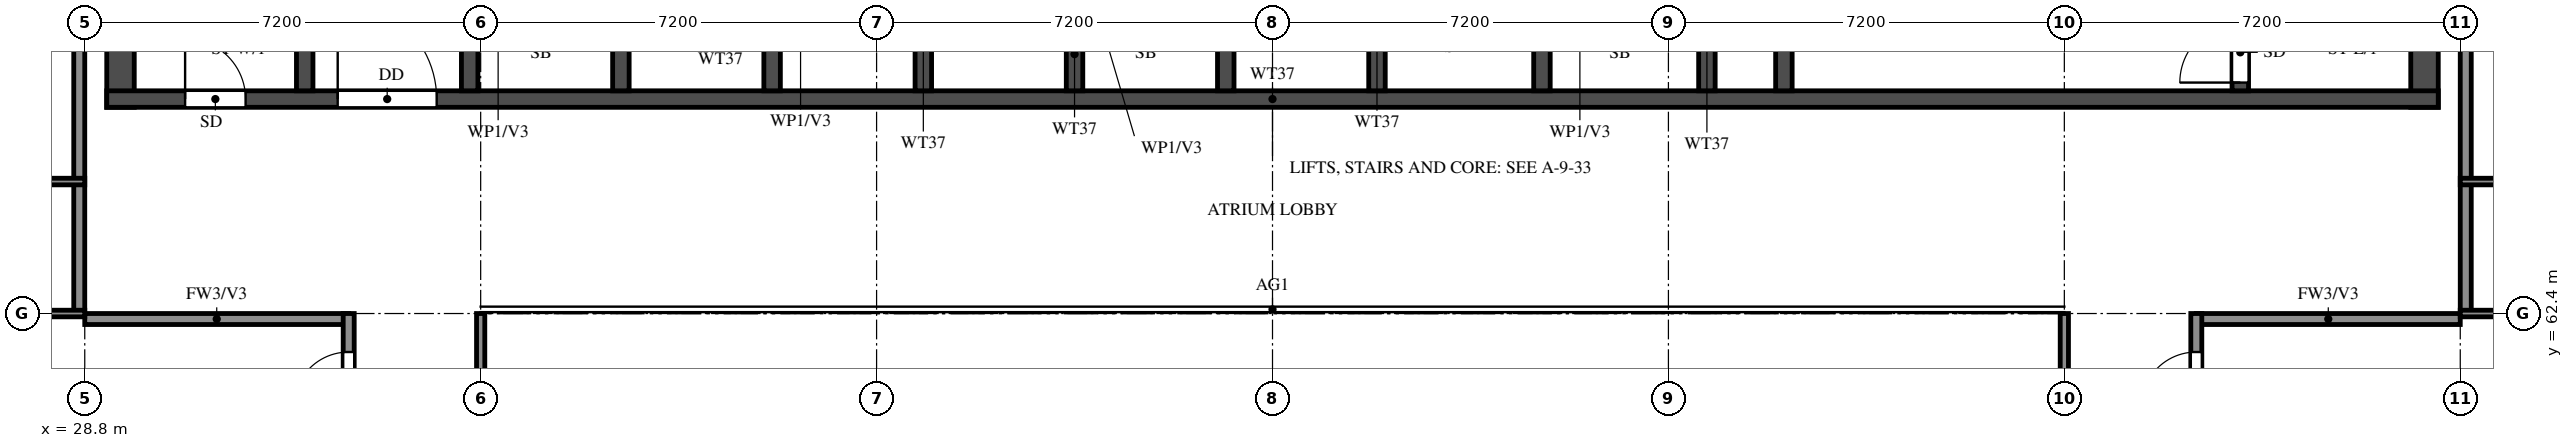
"""IFC4 building model, lengths in metres.
Left out: names, types, materials, properties, quantities, classifications, styles, units other than length and angle.
Written with IfcOpenShell. Run it as: python <this file> out.ifc"""

import sys

from ifc_helpers import new_model, si_unit, direction, frame, frame_2d, origin, place, context, subcontext, project, spatial, rectangle, extrude, element, fill, save


model = new_model("IFC4")
c1 = context("Model", 3, precision=1e-05, world=origin(), true_north=direction((0.0, 1.0)))
c2 = subcontext(c1, "Body", "Model", "MODEL_VIEW")
j1 = project(units=[si_unit("LENGTHUNIT", "METRE"), si_unit("PLANEANGLEUNIT", "RADIAN")], contexts=[c1])
p1 = place(None, origin())
s1 = spatial("IfcSite", under=j1, at=p1, CompositionType="ELEMENT")
p2 = place(p1, origin())
s2 = spatial("IfcBuilding", under=s1, at=p2, CompositionType="ELEMENT")
p3 = place(p2, frame((0.0, 0.0, 264.0)))
s3 = spatial("IfcBuildingStorey", under=s2, at=p3, CompositionType="ELEMENT", Elevation=264.0)
for number, where, z_axis, x_axis in (
    (1, (29.45, 66.15, 0.0), (0.0, 0.0, 1.0), (0.0, 1.0, 0.0)),
    (2, (71.35, 66.15, 0.0), (0.0, 0.0, 1.0), (0.0, 1.0, 0.0)),
):
    element("IfcWall", number, at=place(p3, frame(where, z_axis=z_axis, x_axis=x_axis)), inside=s3, PredefinedType="SHEAR", context=c2, shape_type="SweptSolid", body=[
        extrude(rectangle(XDim=11.85, YDim=0.5, at=frame_2d((5.925, 0.0))), origin(), (0.0, 0.0, 1.0), 3.22),
    ])
p4 = place(p3, frame((29.2, 66.3, 0.0), z_axis=(0.0, 0.0, 1.0), x_axis=(1.0, 0.0, 0.0)))
e3 = element("IfcWall", 3, at=p4, inside=s3, PredefinedType="SHEAR", context=c2, shape_type="SweptSolid", body=[
    extrude(rectangle(XDim=42.4, YDim=0.3, at=frame_2d((21.2, 0.0))), origin(), (0.0, 0.0, 1.0), 3.22),
])
p5 = place(p4, frame((1.425, 0.0, 0.0)))
e4 = element("IfcOpeningElement", 4, at=p5, cuts=e3, PredefinedType="OPENING", context=c2, shape_type="SweptSolid", body=[
    extrude(rectangle(XDim=1.1, YDim=2.1, at=frame_2d((0.55, 1.05))), frame((0.0, 0.16, 0.0), z_axis=(0.0, -1.0, 0.0), x_axis=(1.0, 0.0, 0.0)), (0.0, 0.0, 1.0), 0.32),
])
p6 = place(p4, frame((4.2, 0.0, 0.0)))
e5 = element("IfcOpeningElement", 5, at=p6, cuts=e3, PredefinedType="OPENING", context=c2, shape_type="SweptSolid", body=[
    extrude(rectangle(XDim=1.8, YDim=2.1, at=frame_2d((0.9, 1.05))), frame((0.0, 0.16, 0.0), z_axis=(0.0, -1.0, 0.0), x_axis=(1.0, 0.0, 0.0)), (0.0, 0.0, 1.0), 0.32),
])
p7 = place(p3, frame((32.8, 66.45, 0.0), z_axis=(0.0, 0.0, 1.0), x_axis=(0.0, 1.0, 0.0)))
e6 = element("IfcWall", 6, at=p7, inside=s3, PredefinedType="SHEAR", context=c2, shape_type="SweptSolid", body=[
    extrude(rectangle(XDim=11.05, YDim=0.3, at=frame_2d((5.525, 0.0))), origin(), (0.0, 0.0, 1.0), 3.22),
])
p8 = place(p3, frame((68.0, 66.45, 0.0), z_axis=(0.0, 0.0, 1.0), x_axis=(0.0, 1.0, 0.0)))
e7 = element("IfcWall", 7, at=p8, inside=s3, PredefinedType="SHEAR", context=c2, shape_type="SweptSolid", body=[
    extrude(rectangle(XDim=11.05, YDim=0.3, at=frame_2d((5.525, 0.0))), origin(), (0.0, 0.0, 1.0), 3.22),
])
p9 = place(p8, frame((0.15, 0.0, 0.0)))
e8 = element("IfcOpeningElement", 8, at=p9, cuts=e7, PredefinedType="OPENING", context=c2, shape_type="SweptSolid", body=[
    extrude(rectangle(XDim=1.1, YDim=2.1, at=frame_2d((0.55, 1.05))), frame((0.0, 0.16, 0.0), z_axis=(0.0, -1.0, 0.0), x_axis=(1.0, 0.0, 0.0)), (0.0, 0.0, 1.0), 0.32),
])
p10 = place(p3, frame((59.7, 66.45, 0.0), z_axis=(0.0, 0.0, 1.0), x_axis=(0.0, 1.0, 0.0)))
e9 = element("IfcWall", 9, at=p10, inside=s3, PredefinedType="SHEAR", context=c2, shape_type="SweptSolid", body=[
    extrude(rectangle(XDim=6.175, YDim=0.3, at=frame_2d((3.087, 0.0))), origin(), (0.0, 0.0, 1.0), 3.22),
])
p11 = place(p10, frame((3.85, 0.0, 0.0)))
e10 = element("IfcOpeningElement", 10, at=p11, cuts=e9, PredefinedType="OPENING", context=c2, shape_type="SweptSolid", body=[
    extrude(rectangle(XDim=1.2, YDim=2.1, at=frame_2d((0.6, 1.05))), frame((0.0, 0.16, 0.0), z_axis=(0.0, -1.0, 0.0), x_axis=(1.0, 0.0, 0.0)), (0.0, 0.0, 1.0), 0.32),
])
for number, where, z_axis, x_axis in (
    (11, (35.8, 66.45, 0.0), (0.0, 0.0, 1.0), (0.0, 1.0, 0.0)),
    (12, (38.55, 66.45, 0.0), (0.0, 0.0, 1.0), (0.0, 1.0, 0.0)),
    (13, (41.3, 66.45, 0.0), (0.0, 0.0, 1.0), (0.0, 1.0, 0.0)),
    (14, (44.05, 66.45, 0.0), (0.0, 0.0, 1.0), (0.0, 1.0, 0.0)),
    (15, (46.8, 66.45, 0.0), (0.0, 0.0, 1.0), (0.0, 1.0, 0.0)),
    (16, (49.55, 66.45, 0.0), (0.0, 0.0, 1.0), (0.0, 1.0, 0.0)),
    (17, (52.3, 66.45, 0.0), (0.0, 0.0, 1.0), (0.0, 1.0, 0.0)),
    (18, (55.3, 66.45, 0.0), (0.0, 0.0, 1.0), (0.0, 1.0, 0.0)),
    (19, (58.3, 66.45, 0.0), (0.0, 0.0, 1.0), (0.0, 1.0, 0.0)),
):
    element("IfcWall", number, at=place(p3, frame(where, z_axis=z_axis, x_axis=x_axis)), inside=s3, PredefinedType="SHEAR", context=c2, shape_type="SweptSolid", body=[
        extrude(rectangle(XDim=2.425, YDim=0.3, at=frame_2d((1.212, 0.0))), origin(), (0.0, 0.0, 1.0), 3.22),
    ])
for number, where, z_axis, x_axis in (
    (20, (28.8, 62.3, 0.0), (0.0, 0.0, 1.0), (1.0, 0.0, 0.0)),
    (21, (67.2, 62.3, 0.0), (0.0, 0.0, 1.0), (1.0, 0.0, 0.0)),
):
    element("IfcWall", number, at=place(p3, frame(where, z_axis=z_axis, x_axis=x_axis)), inside=s3, PredefinedType="SOLIDWALL", context=c2, shape_type="SweptSolid", body=[
        extrude(rectangle(XDim=4.8, YDim=0.2, at=frame_2d((2.4, 0.0))), origin(), (0.0, 0.0, 1.0), 3.22),
    ])
p12 = place(p3, frame((28.7, 62.4, 0.0), z_axis=(0.0, 0.0, 1.0), x_axis=(0.0, 1.0, 0.0)))
e22 = element("IfcWall", 22, at=p12, inside=s3, PredefinedType="SOLIDWALL", context=c2, shape_type="SweptSolid", body=[
    extrude(rectangle(XDim=15.6, YDim=0.2, at=frame_2d((7.8, 0.0))), origin(), (0.0, 0.0, 1.0), 3.22),
])
p13 = place(p3, frame((33.6, 45.6, 0.0), z_axis=(0.0, 0.0, 1.0), x_axis=(0.0, 1.0, 0.0)))
e23 = element("IfcWall", 23, at=p13, inside=s3, PredefinedType="SOLIDWALL", context=c2, shape_type="SweptSolid", body=[
    extrude(rectangle(XDim=16.8, YDim=0.2, at=frame_2d((8.4, 0.0))), origin(), (0.0, 0.0, 1.0), 3.22),
])
p14 = place(p13, frame((0.7, 0.0, 0.0)))
e24 = element("IfcOpeningElement", 24, at=p14, cuts=e23, PredefinedType="OPENING", context=c2, shape_type="SweptSolid", body=[
    extrude(rectangle(XDim=1.0, YDim=2.1, at=frame_2d((0.5, 1.05))), frame((0.0, 0.11, 0.0), z_axis=(0.0, -1.0, 0.0), x_axis=(1.0, 0.0, 0.0)), (0.0, 0.0, 1.0), 0.22),
])
p15 = place(p13, frame((8.3, 0.0, 0.0)))
e25 = element("IfcOpeningElement", 25, at=p15, cuts=e23, PredefinedType="OPENING", context=c2, shape_type="SweptSolid", body=[
    extrude(rectangle(XDim=1.0, YDim=2.1, at=frame_2d((0.5, 1.05))), frame((0.0, 0.11, 0.0), z_axis=(0.0, -1.0, 0.0), x_axis=(1.0, 0.0, 0.0)), (0.0, 0.0, 1.0), 0.22),
])
p16 = place(p13, frame((15.1, 0.0, 0.0)))
e26 = element("IfcOpeningElement", 26, at=p16, cuts=e23, PredefinedType="OPENING", context=c2, shape_type="SweptSolid", body=[
    extrude(rectangle(XDim=1.0, YDim=2.1, at=frame_2d((0.5, 1.05))), frame((0.0, 0.11, 0.0), z_axis=(0.0, -1.0, 0.0), x_axis=(1.0, 0.0, 0.0)), (0.0, 0.0, 1.0), 0.22),
])
p17 = place(p3, frame((67.2, 45.6, 0.0), z_axis=(0.0, 0.0, 1.0), x_axis=(0.0, 1.0, 0.0)))
e27 = element("IfcWall", 27, at=p17, inside=s3, PredefinedType="SOLIDWALL", context=c2, shape_type="SweptSolid", body=[
    extrude(rectangle(XDim=16.8, YDim=0.2, at=frame_2d((8.4, 0.0))), origin(), (0.0, 0.0, 1.0), 3.22),
])
p18 = place(p17, frame((8.3, 0.0, 0.0)))
e28 = element("IfcOpeningElement", 28, at=p18, cuts=e27, PredefinedType="OPENING", context=c2, shape_type="SweptSolid", body=[
    extrude(rectangle(XDim=1.0, YDim=2.1, at=frame_2d((0.5, 1.05))), frame((0.0, 0.11, 0.0), z_axis=(0.0, -1.0, 0.0), x_axis=(1.0, 0.0, 0.0)), (0.0, 0.0, 1.0), 0.22),
])
p19 = place(p17, frame((15.1, 0.0, 0.0)))
e29 = element("IfcOpeningElement", 29, at=p19, cuts=e27, PredefinedType="OPENING", context=c2, shape_type="SweptSolid", body=[
    extrude(rectangle(XDim=1.0, YDim=2.1, at=frame_2d((0.5, 1.05))), frame((0.0, 0.11, 0.0), z_axis=(0.0, -1.0, 0.0), x_axis=(1.0, 0.0, 0.0)), (0.0, 0.0, 1.0), 0.22),
])
p20 = place(p17, frame((0.7, 0.0, 0.0)))
e30 = element("IfcOpeningElement", 30, at=p20, cuts=e27, PredefinedType="OPENING", context=c2, shape_type="SweptSolid", body=[
    extrude(rectangle(XDim=1.0, YDim=2.1, at=frame_2d((0.5, 1.05))), frame((0.0, 0.11, 0.0), z_axis=(0.0, -1.0, 0.0), x_axis=(1.0, 0.0, 0.0)), (0.0, 0.0, 1.0), 0.22),
])
p21 = place(p3, frame((72.1, 62.4, 0.0), z_axis=(0.0, 0.0, 1.0), x_axis=(0.0, 1.0, 0.0)))
e31 = element("IfcWall", 31, at=p21, inside=s3, PredefinedType="SOLIDWALL", context=c2, shape_type="SweptSolid", body=[
    extrude(rectangle(XDim=15.6, YDim=0.2, at=frame_2d((7.8, 0.0))), origin(), (0.0, 0.0, 1.0), 3.22),
])
p22 = place(p3, frame((26.4, 62.4, 0.0), z_axis=(0.0, 0.0, 1.0), x_axis=(1.0, 0.0, 0.0)))
e32 = element("IfcWall", 32, at=p22, inside=s3, PredefinedType="PARTITIONING", context=c2, shape_type="SweptSolid", body=[
    extrude(rectangle(XDim=2.4, YDim=0.12, at=frame_2d((1.2, 0.0))), origin(), (0.0, 0.0, 1.0), 3.22),
])
p23 = place(p22, frame((0.75, 0.0, 0.0)))
e33 = element("IfcOpeningElement", 33, at=p23, cuts=e32, PredefinedType="OPENING", context=c2, shape_type="SweptSolid", body=[
    extrude(rectangle(XDim=0.9, YDim=2.1, at=frame_2d((0.45, 1.05))), frame((0.0, 0.07, 0.0), z_axis=(0.0, -1.0, 0.0), x_axis=(1.0, 0.0, 0.0)), (0.0, 0.0, 1.0), 0.14),
])
p24 = place(p3, frame((72.0, 62.4, 0.0), z_axis=(0.0, 0.0, 1.0), x_axis=(1.0, 0.0, 0.0)))
e34 = element("IfcWall", 34, at=p24, inside=s3, PredefinedType="PARTITIONING", context=c2, shape_type="SweptSolid", body=[
    extrude(rectangle(XDim=2.4, YDim=0.12, at=frame_2d((1.2, 0.0))), origin(), (0.0, 0.0, 1.0), 3.22),
])
p25 = place(p24, frame((0.75, 0.0, 0.0)))
e35 = element("IfcOpeningElement", 35, at=p25, cuts=e34, PredefinedType="OPENING", context=c2, shape_type="SweptSolid", body=[
    extrude(rectangle(XDim=0.9, YDim=2.1, at=frame_2d((0.45, 1.05))), frame((0.0, 0.07, 0.0), z_axis=(0.0, -1.0, 0.0), x_axis=(1.0, 0.0, 0.0)), (0.0, 0.0, 1.0), 0.14),
])
p26 = place(p3, frame((25.3, 64.8, 0.0), z_axis=(0.0, 0.0, 1.0), x_axis=(1.0, 0.0, 0.0)))
e36 = element("IfcWall", 36, at=p26, inside=s3, PredefinedType="PARTITIONING", context=c2, shape_type="SweptSolid", body=[
    extrude(rectangle(XDim=3.5, YDim=0.12, at=frame_2d((1.75, 0.0))), origin(), (0.0, 0.0, 1.0), 3.22),
])
p27 = place(p26, frame((1.3, 0.0, 0.0)))
e37 = element("IfcOpeningElement", 37, at=p27, cuts=e36, PredefinedType="OPENING", context=c2, shape_type="SweptSolid", body=[
    extrude(rectangle(XDim=0.9, YDim=2.1, at=frame_2d((0.45, 1.05))), frame((0.0, 0.07, 0.0), z_axis=(0.0, -1.0, 0.0), x_axis=(1.0, 0.0, 0.0)), (0.0, 0.0, 1.0), 0.14),
])
p28 = place(p3, frame((72.0, 64.8, 0.0), z_axis=(0.0, 0.0, 1.0), x_axis=(1.0, 0.0, 0.0)))
e38 = element("IfcWall", 38, at=p28, inside=s3, PredefinedType="PARTITIONING", context=c2, shape_type="SweptSolid", body=[
    extrude(rectangle(XDim=3.5, YDim=0.12, at=frame_2d((1.75, 0.0))), origin(), (0.0, 0.0, 1.0), 3.22),
])
p29 = place(p28, frame((1.3, 0.0, 0.0)))
e39 = element("IfcOpeningElement", 39, at=p29, cuts=e38, PredefinedType="OPENING", context=c2, shape_type="SweptSolid", body=[
    extrude(rectangle(XDim=0.9, YDim=2.1, at=frame_2d((0.45, 1.05))), frame((0.0, 0.07, 0.0), z_axis=(0.0, -1.0, 0.0), x_axis=(1.0, 0.0, 0.0)), (0.0, 0.0, 1.0), 0.14),
])
for number, where, z_axis, x_axis in (
    (40, (36.0, 48.0, 0.0), (0.0, 0.0, 1.0), (0.0, 1.0, 0.0)),
    (41, (64.8, 48.0, 0.0), (0.0, 0.0, 1.0), (0.0, 1.0, 0.0)),
):
    element("IfcWall", number, at=place(p3, frame(where, z_axis=z_axis, x_axis=x_axis)), inside=s3, PredefinedType="SOLIDWALL", context=c2, shape_type="SweptSolid", body=[
        extrude(rectangle(XDim=14.4, YDim=0.15, at=frame_2d((7.2, 0.0))), origin(), (0.0, 0.0, 1.0), 2.32),
    ])
p30 = place(p5, origin())
e42 = element("IfcDoor", 42, at=p30, inside=s3, OperationType="SINGLE_SWING_LEFT", PredefinedType="DOOR", context=c2, shape_type="SweptSolid", body=[
    extrude(rectangle(XDim=1.1, YDim=2.1, at=frame_2d((0.55, 1.05))), frame((0.0, 0.025, 0.0), z_axis=(0.0, -1.0, 0.0), x_axis=(1.0, 0.0, 0.0)), (0.0, 0.0, 1.0), 0.05),
])
fill(e4, e42)
p31 = place(p9, origin())
e43 = element("IfcDoor", 43, at=p31, inside=s3, OperationType="SINGLE_SWING_RIGHT", PredefinedType="DOOR", context=c2, shape_type="SweptSolid", body=[
    extrude(rectangle(XDim=1.1, YDim=2.1, at=frame_2d((0.55, 1.05))), frame((0.0, 0.025, 0.0), z_axis=(0.0, -1.0, 0.0), x_axis=(1.0, 0.0, 0.0)), (0.0, 0.0, 1.0), 0.05),
])
fill(e8, e43)
p32 = place(p6, origin())
e44 = element("IfcDoor", 44, at=p32, inside=s3, OperationType="DOUBLE_DOOR_SINGLE_SWING", PredefinedType="DOOR", context=c2, shape_type="SweptSolid", body=[
    extrude(rectangle(XDim=1.8, YDim=2.1, at=frame_2d((0.9, 1.05))), frame((0.0, 0.025, 0.0), z_axis=(0.0, -1.0, 0.0), x_axis=(1.0, 0.0, 0.0)), (0.0, 0.0, 1.0), 0.05),
])
fill(e5, e44)
p33 = place(p16, origin())
e45 = element("IfcDoor", 45, at=p33, inside=s3, OperationType="SINGLE_SWING_RIGHT", PredefinedType="DOOR", context=c2, shape_type="SweptSolid", body=[
    extrude(rectangle(XDim=1.0, YDim=2.1, at=frame_2d((0.5, 1.05))), frame((0.0, 0.025, 0.0), z_axis=(0.0, -1.0, 0.0), x_axis=(1.0, 0.0, 0.0)), (0.0, 0.0, 1.0), 0.05),
])
fill(e26, e45)
p34 = place(p19, origin())
e46 = element("IfcDoor", 46, at=p34, inside=s3, OperationType="SINGLE_SWING_LEFT", PredefinedType="DOOR", context=c2, shape_type="SweptSolid", body=[
    extrude(rectangle(XDim=1.0, YDim=2.1, at=frame_2d((0.5, 1.05))), frame((0.0, 0.025, 0.0), z_axis=(0.0, -1.0, 0.0), x_axis=(1.0, 0.0, 0.0)), (0.0, 0.0, 1.0), 0.05),
])
fill(e29, e46)
save(model, sys.argv[1])
